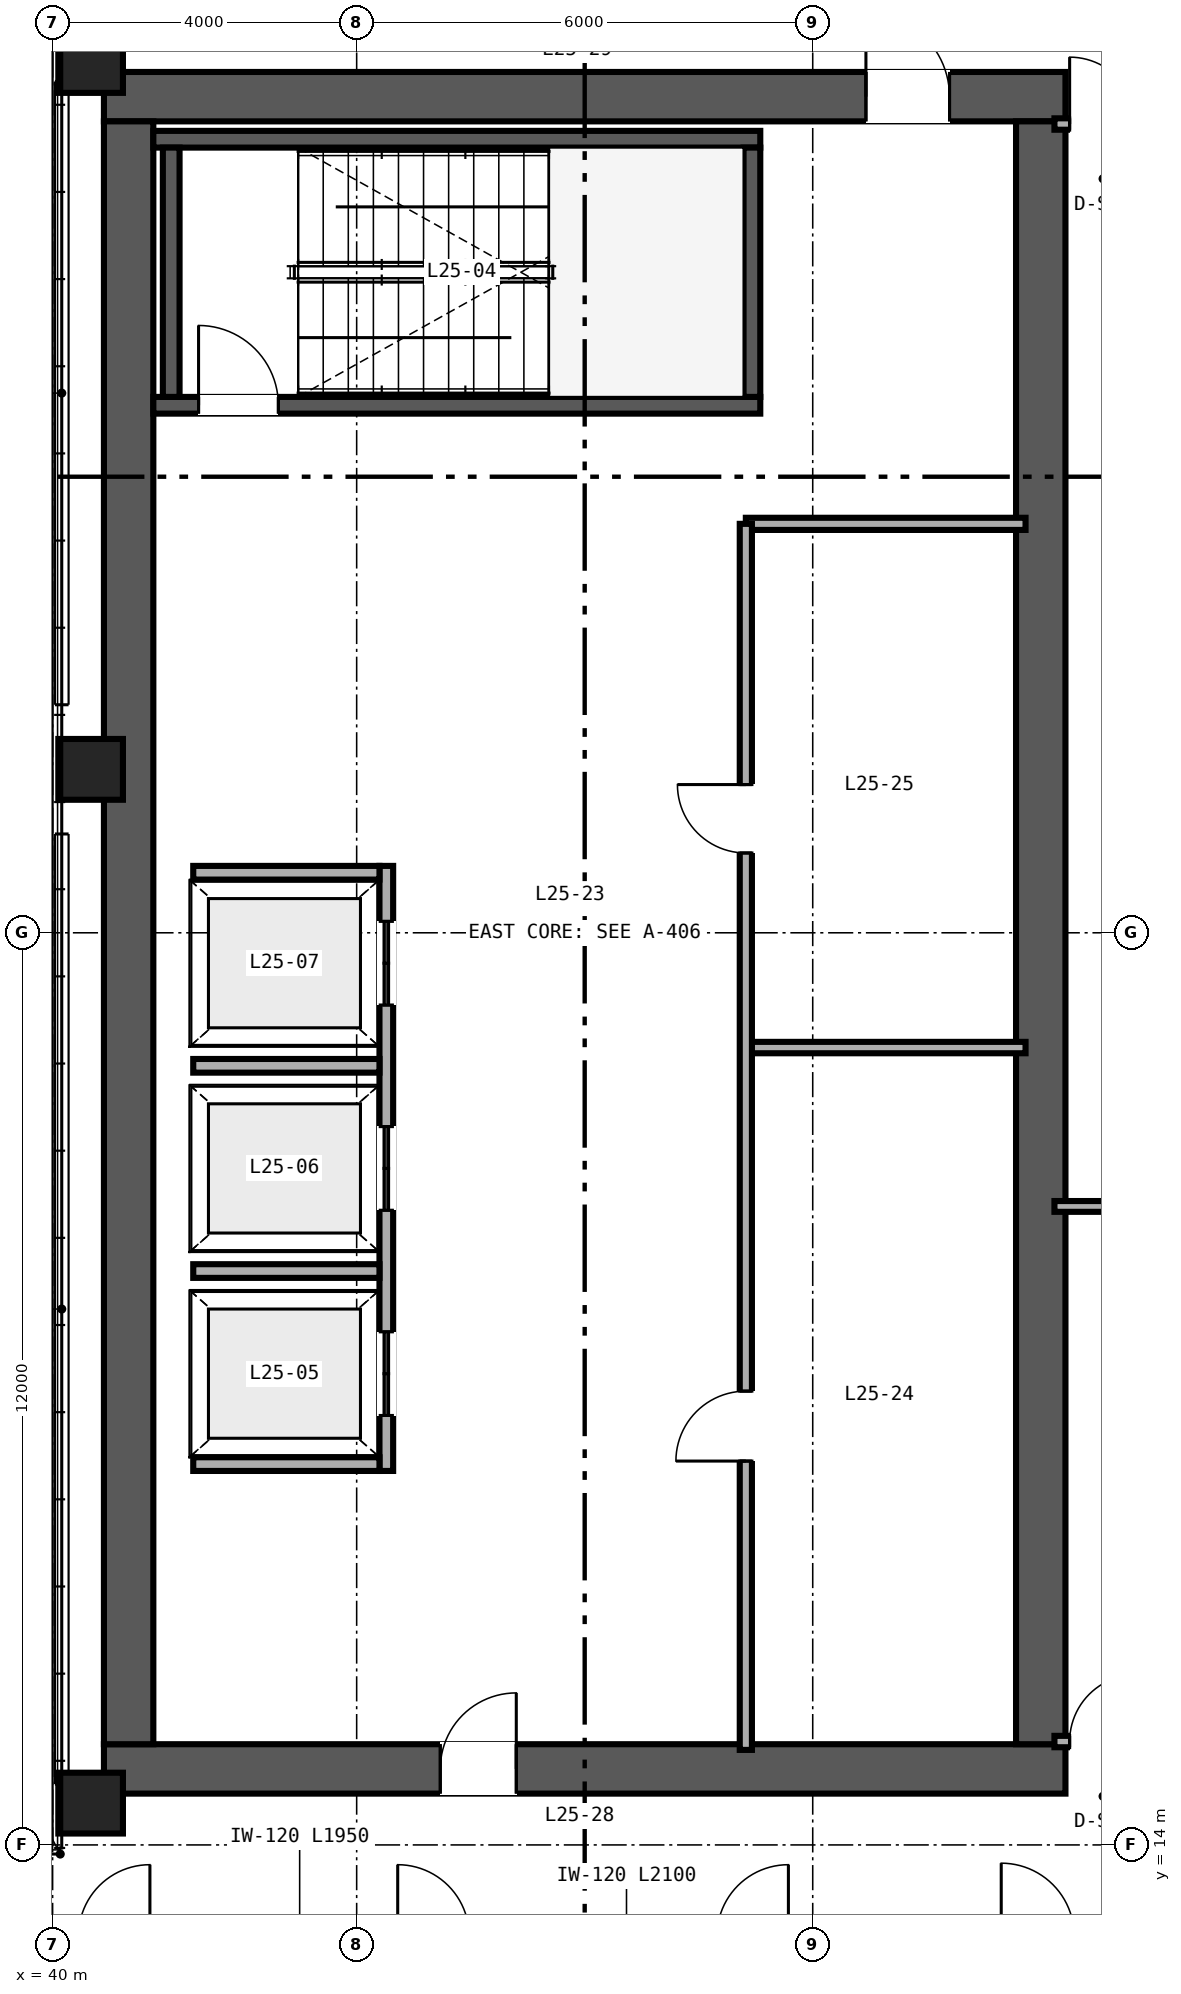
"""IFC4 building model, lengths in metres.
Left out: names, types, materials, properties, quantities, classifications, styles, units other than length and angle.
Written with IfcOpenShell. Run it as: python <this file> out.ifc"""

import sys

from ifc_helpers import new_model, si_unit, direction, frame, frame_2d, origin, origin_2d, place, context, subcontext, project, spatial, rectangle, hollow_rectangle, extrude, source, transform, mapped, element, fill, save


model = new_model("IFC4")
c1 = context("Model", 3, precision=1e-05, world=origin(), true_north=direction((0.0, 1.0)))
c2 = subcontext(c1, "Body", "Model", "MODEL_VIEW")
j1 = project(units=[si_unit("LENGTHUNIT", "METRE"), si_unit("PLANEANGLEUNIT", "RADIAN")], contexts=[c1])
p1 = place(None, origin())
s1 = spatial("IfcSite", under=j1, at=p1, CompositionType="ELEMENT")
p2 = place(p1, origin())
s2 = spatial("IfcBuilding", under=s1, at=p2, CompositionType="ELEMENT")
p3 = place(p2, frame((0.0, 0.0, 104.4)))
s3 = spatial("IfcBuildingStorey", under=s2, at=p3, CompositionType="ELEMENT", Elevation=104.4)
p4 = place(p3, frame((40.675, 15.0, 0.0), z_axis=(0.0, 0.0, 1.0), x_axis=(1.0, 0.0, 0.0)))
e1 = element("IfcWall", 1, at=p4, inside=s3, PredefinedType="SHEAR", context=c2, shape_type="SweptSolid", body=[
    extrude(rectangle(XDim=12.65, YDim=0.65, at=frame_2d((6.325, 0.0))), origin(), (0.0, 0.0, 1.0), 3.36),
])
p5 = place(p4, frame((4.425, 0.0, 0.0)))
e2 = element("IfcOpeningElement", 2, at=p5, cuts=e1, PredefinedType="OPENING", context=c2, shape_type="SweptSolid", body=[
    extrude(rectangle(XDim=1.0, YDim=2.15, at=frame_2d((0.5, 1.075))), frame((0.0, 0.335, 0.0), z_axis=(0.0, -1.0, 0.0), x_axis=(1.0, 0.0, 0.0)), (0.0, 0.0, 1.0), 0.67),
])
p6 = place(p3, frame((40.675, 37.0, 0.0), z_axis=(0.0, 0.0, 1.0), x_axis=(1.0, 0.0, 0.0)))
e3 = element("IfcWall", 3, at=p6, inside=s3, PredefinedType="SHEAR", context=c2, shape_type="SweptSolid", body=[
    extrude(rectangle(XDim=12.65, YDim=0.65, at=frame_2d((6.325, 0.0))), origin(), (0.0, 0.0, 1.0), 3.36),
])
p7 = place(p6, frame((10.025, 0.0, 0.0)))
e4 = element("IfcOpeningElement", 4, at=p7, cuts=e3, PredefinedType="OPENING", context=c2, shape_type="SweptSolid", body=[
    extrude(rectangle(XDim=1.1, YDim=2.15, at=frame_2d((0.55, 1.075))), frame((0.0, 0.335, 0.0), z_axis=(0.0, -1.0, 0.0), x_axis=(1.0, 0.0, 0.0)), (0.0, 0.0, 1.0), 0.67),
])
for number, where, z_axis, x_axis in (
    (5, (41.0, 15.325, 0.0), (0.0, 0.0, 1.0), (0.0, 1.0, 0.0)),
    (6, (53.0, 15.325, 0.0), (0.0, 0.0, 1.0), (0.0, 1.0, 0.0)),
):
    element("IfcWall", number, at=place(p3, frame(where, z_axis=z_axis, x_axis=x_axis)), inside=s3, PredefinedType="SHEAR", context=c2, shape_type="SweptSolid", body=[
        extrude(rectangle(XDim=21.35, YDim=0.65, at=frame_2d((10.675, 0.0))), origin(), (0.0, 0.0, 1.0), 3.36),
    ])
p8 = place(p3, frame((41.325, 32.94, 0.0), z_axis=(0.0, 0.0, 1.0), x_axis=(1.0, 0.0, 0.0)))
e7 = element("IfcWall", 7, at=p8, inside=s3, PredefinedType="SHEAR", context=c2, shape_type="SweptSolid", body=[
    extrude(rectangle(XDim=7.985, YDim=0.22, at=frame_2d((3.993, 0.0))), origin(), (0.0, 0.0, 1.0), 3.4),
])
p9 = place(p8, frame((0.595, 0.0, 0.0)))
e8 = element("IfcOpeningElement", 8, at=p9, cuts=e7, PredefinedType="OPENING", context=c2, shape_type="SweptSolid", body=[
    extrude(rectangle(XDim=1.05, YDim=2.15, at=frame_2d((0.525, 1.075))), frame((0.0, 0.12, 0.0), z_axis=(0.0, -1.0, 0.0), x_axis=(1.0, 0.0, 0.0)), (0.0, 0.0, 1.0), 0.24),
])
p10 = place(p3, frame((41.325, 36.44, 0.0), z_axis=(0.0, 0.0, 1.0), x_axis=(1.0, 0.0, 0.0)))
e9 = element("IfcWall", 9, at=p10, inside=s3, PredefinedType="SHEAR", context=c2, shape_type="SweptSolid", body=[
    extrude(rectangle(XDim=7.985, YDim=0.22, at=frame_2d((3.993, 0.0))), origin(), (0.0, 0.0, 1.0), 3.4),
])
for number, where, z_axis, x_axis in (
    (10, (41.56, 33.05, 0.0), (0.0, 0.0, 1.0), (0.0, 1.0, 0.0)),
    (11, (49.2, 33.05, 0.0), (0.0, 0.0, 1.0), (0.0, 1.0, 0.0)),
):
    element("IfcWall", number, at=place(p3, frame(where, z_axis=z_axis, x_axis=x_axis)), inside=s3, PredefinedType="SHEAR", context=c2, shape_type="SweptSolid", body=[
        extrude(rectangle(XDim=3.28, YDim=0.22, at=frame_2d((1.64, 0.0))), origin(), (0.0, 0.0, 1.0), 3.4),
    ])
m1 = source(origin(), c2, "Body", "SweptSolid", [
    extrude(hollow_rectangle(XDim=0.85, YDim=0.8, WallThickness=0.032, at=origin_2d()), origin(), (0.0, 0.0, 1.0), 3.36),
])
for number, where, z_axis, x_axis in (
    (12, (40.5, 14.55, 0.0), (0.0, 0.0, 1.0), (1.0, 0.0, 0.0)),
    (13, (40.5, 28.15, 0.0), (0.0, 0.0, 1.0), (1.0, 0.0, 0.0)),
    (14, (40.5, 37.45, 0.0), (0.0, 0.0, 1.0), (1.0, 0.0, 0.0)),
):
    element("IfcColumn", number, at=place(p3, frame(where, z_axis=z_axis, x_axis=x_axis)), inside=s3, PredefinedType="COLUMN", context=c2, shape_type="MappedRepresentation", body=[
        mapped(m1, transform((0.0, 0.0, 0.0), scale=1.0)),
    ])
p11 = place(p3, frame((44.39, 18.92, 0.0), z_axis=(0.0, 0.0, 1.0), x_axis=(0.0, 1.0, 0.0)))
e15 = element("IfcWall", 15, at=p11, inside=s3, PredefinedType="SOLIDWALL", context=c2, shape_type="SweptSolid", body=[
    extrude(rectangle(XDim=7.96, YDim=0.18, at=frame_2d((3.98, 0.0))), origin(), (0.0, 0.0, 1.0), 3.36),
])
p12 = place(p11, frame((0.73, 0.0, 0.0)))
e16 = element("IfcOpeningElement", 16, at=p12, cuts=e15, PredefinedType="OPENING", context=c2, shape_type="SweptSolid", body=[
    extrude(rectangle(XDim=1.1, YDim=2.2, at=frame_2d((0.55, 1.1))), frame((0.0, 0.1, 0.0), z_axis=(0.0, -1.0, 0.0), x_axis=(1.0, 0.0, 0.0)), (0.0, 0.0, 1.0), 0.2),
])
p13 = place(p11, frame((3.43, 0.0, 0.0)))
e17 = element("IfcOpeningElement", 17, at=p13, cuts=e15, PredefinedType="OPENING", context=c2, shape_type="SweptSolid", body=[
    extrude(rectangle(XDim=1.1, YDim=2.2, at=frame_2d((0.55, 1.1))), frame((0.0, 0.1, 0.0), z_axis=(0.0, -1.0, 0.0), x_axis=(1.0, 0.0, 0.0)), (0.0, 0.0, 1.0), 0.2),
])
p14 = place(p11, frame((6.13, 0.0, 0.0)))
e18 = element("IfcOpeningElement", 18, at=p14, cuts=e15, PredefinedType="OPENING", context=c2, shape_type="SweptSolid", body=[
    extrude(rectangle(XDim=1.1, YDim=2.2, at=frame_2d((0.55, 1.1))), frame((0.0, 0.1, 0.0), z_axis=(0.0, -1.0, 0.0), x_axis=(1.0, 0.0, 0.0)), (0.0, 0.0, 1.0), 0.2),
])
for number, where, z_axis, x_axis in (
    (19, (41.85, 19.01, 0.0), (0.0, 0.0, 1.0), (1.0, 0.0, 0.0)),
    (20, (41.85, 26.79, 0.0), (0.0, 0.0, 1.0), (1.0, 0.0, 0.0)),
    (21, (41.85, 21.55, 0.0), (0.0, 0.0, 1.0), (1.0, 0.0, 0.0)),
    (22, (41.85, 24.25, 0.0), (0.0, 0.0, 1.0), (1.0, 0.0, 0.0)),
):
    element("IfcWall", number, at=place(p3, frame(where, z_axis=z_axis, x_axis=x_axis)), inside=s3, PredefinedType="SOLIDWALL", context=c2, shape_type="SweptSolid", body=[
        extrude(rectangle(XDim=2.45, YDim=0.18, at=frame_2d((1.225, 0.0))), origin(), (0.0, 0.0, 1.0), 3.36),
    ])
p15 = place(p3, frame((49.12, 31.38, 0.0), z_axis=(0.0, 0.0, 1.0), x_axis=(1.0, 0.0, 0.0)))
e23 = element("IfcWall", 23, at=p15, inside=s3, PredefinedType="PARTITIONING", context=c2, shape_type="SweptSolid", body=[
    extrude(rectangle(XDim=3.68, YDim=0.16, at=frame_2d((1.84, 0.0))), origin(), (0.0, 0.0, 1.0), 2.36),
])
p16 = place(p3, frame((49.12, 24.49, 0.0), z_axis=(0.0, 0.0, 1.0), x_axis=(1.0, 0.0, 0.0)))
e24 = element("IfcWall", 24, at=p16, inside=s3, PredefinedType="PARTITIONING", context=c2, shape_type="SweptSolid", body=[
    extrude(rectangle(XDim=3.68, YDim=0.15, at=frame_2d((1.84, 0.0))), origin(), (0.0, 0.0, 1.0), 3.36),
])
p17 = place(p3, frame((49.12, 15.25, 0.0), z_axis=(0.0, 0.0, 1.0), x_axis=(0.0, 1.0, 0.0)))
e25 = element("IfcWall", 25, at=p17, inside=s3, PredefinedType="PARTITIONING", context=c2, shape_type="SweptSolid", body=[
    extrude(rectangle(XDim=16.13, YDim=0.16, at=frame_2d((8.065, 0.0))), origin(), (0.0, 0.0, 1.0), 2.36),
])
p18 = place(p17, frame((3.8, 0.0, 0.0)))
e26 = element("IfcOpeningElement", 26, at=p18, cuts=e25, PredefinedType="OPENING", context=c2, shape_type="SweptSolid", body=[
    extrude(rectangle(XDim=0.92, YDim=2.15, at=frame_2d((0.46, 1.075))), frame((0.0, 0.09, 0.0), z_axis=(0.0, -1.0, 0.0), x_axis=(1.0, 0.0, 0.0)), (0.0, 0.0, 1.0), 0.18),
])
p19 = place(p17, frame((11.8, 0.0, 0.0)))
e27 = element("IfcOpeningElement", 27, at=p19, cuts=e25, PredefinedType="OPENING", context=c2, shape_type="SweptSolid", body=[
    extrude(rectangle(XDim=0.9, YDim=2.15, at=frame_2d((0.45, 1.075))), frame((0.0, 0.09, 0.0), z_axis=(0.0, -1.0, 0.0), x_axis=(1.0, 0.0, 0.0)), (0.0, 0.0, 1.0), 0.18),
])
p20 = place(p3, frame((53.18, 15.36, 0.0), z_axis=(0.0, 0.0, 1.0), x_axis=(1.0, 0.0, 0.0)))
e28 = element("IfcWall", 28, at=p20, inside=s3, PredefinedType="PARTITIONING", context=c2, shape_type="SweptSolid", body=[
    extrude(rectangle(XDim=2.66, YDim=0.15, at=frame_2d((1.33, 0.0))), origin(), (0.0, 0.0, 1.0), 2.581),
])
p21 = place(p20, frame((0.2, 0.0, 0.0)))
e29 = element("IfcOpeningElement", 29, at=p21, cuts=e28, PredefinedType="OPENING", context=c2, shape_type="SweptSolid", body=[
    extrude(rectangle(XDim=0.88, YDim=2.15, at=frame_2d((0.44, 1.075))), frame((0.0, 0.085, 0.0), z_axis=(0.0, -1.0, 0.0), x_axis=(1.0, 0.0, 0.0)), (0.0, 0.0, 1.0), 0.17),
])
p22 = place(p3, frame((53.18, 36.64, 0.0), z_axis=(0.0, 0.0, 1.0), x_axis=(1.0, 0.0, 0.0)))
e30 = element("IfcWall", 30, at=p22, inside=s3, PredefinedType="PARTITIONING", context=c2, shape_type="SweptSolid", body=[
    extrude(rectangle(XDim=2.66, YDim=0.15, at=frame_2d((1.33, 0.0))), origin(), (0.0, 0.0, 1.0), 2.743),
])
p23 = place(p22, frame((0.2, 0.0, 0.0)))
e31 = element("IfcOpeningElement", 31, at=p23, cuts=e30, PredefinedType="OPENING", context=c2, shape_type="SweptSolid", body=[
    extrude(rectangle(XDim=0.88, YDim=2.15, at=frame_2d((0.44, 1.075))), frame((0.0, 0.085, 0.0), z_axis=(0.0, -1.0, 0.0), x_axis=(1.0, 0.0, 0.0)), (0.0, 0.0, 1.0), 0.17),
])
p24 = place(p3, frame((53.18, 22.4, 0.0), z_axis=(0.0, 0.0, 1.0), x_axis=(1.0, 0.0, 0.0)))
e32 = element("IfcWall", 32, at=p24, inside=s3, PredefinedType="PARTITIONING", context=c2, shape_type="SweptSolid", body=[
    extrude(rectangle(XDim=2.66, YDim=0.142, at=frame_2d((1.33, 0.0))), origin(), (0.0, 0.0, 1.0), 2.581),
])
m2 = source(origin(), c2, "Body", "SweptSolid", [
    extrude(rectangle(XDim=1.05, YDim=2.15, at=frame_2d((0.525, 1.075))), frame((0.0, 0.025, 0.0), z_axis=(0.0, -1.0, 0.0), x_axis=(1.0, 0.0, 0.0)), (0.0, 0.0, 1.0), 0.05),
])
p25 = place(p9, origin())
e33 = element("IfcDoor", 33, at=p25, inside=s3, OperationType="SINGLE_SWING_LEFT", PredefinedType="DOOR", context=c2, shape_type="MappedRepresentation", body=[
    mapped(m2, transform((0.0, 0.0, 0.0), scale=1.0)),
])
fill(e8, e33)
m3 = source(origin(), c2, "Body", "SweptSolid", [
    extrude(rectangle(XDim=1.1, YDim=2.2, at=frame_2d((0.55, 1.1))), frame((0.0, 0.025, 0.0), z_axis=(0.0, -1.0, 0.0), x_axis=(1.0, 0.0, 0.0)), (0.0, 0.0, 1.0), 0.05),
])
p26 = place(p12, origin())
e34 = element("IfcDoor", 34, at=p26, inside=s3, OperationType="DOUBLE_DOOR_SLIDING", PredefinedType="DOOR", context=c2, shape_type="MappedRepresentation", body=[
    mapped(m3, transform((0.0, 0.0, 0.0), scale=1.0)),
])
fill(e16, e34)
p27 = place(p13, origin())
e35 = element("IfcDoor", 35, at=p27, inside=s3, OperationType="DOUBLE_DOOR_SLIDING", PredefinedType="DOOR", context=c2, shape_type="MappedRepresentation", body=[
    mapped(m3, transform((0.0, 0.0, 0.0), scale=1.0)),
])
fill(e17, e35)
p28 = place(p14, origin())
e36 = element("IfcDoor", 36, at=p28, inside=s3, OperationType="DOUBLE_DOOR_SLIDING", PredefinedType="DOOR", context=c2, shape_type="MappedRepresentation", body=[
    mapped(m3, transform((0.0, 0.0, 0.0), scale=1.0)),
])
fill(e18, e36)
m4 = source(origin(), c2, "Body", "SweptSolid", [
    extrude(rectangle(XDim=1.0, YDim=2.15, at=frame_2d((0.5, 1.075))), frame((0.0, 0.025, 0.0), z_axis=(0.0, -1.0, 0.0), x_axis=(1.0, 0.0, 0.0)), (0.0, 0.0, 1.0), 0.05),
])
p29 = place(p5, origin())
e37 = element("IfcDoor", 37, at=p29, inside=s3, OperationType="SINGLE_SWING_RIGHT", PredefinedType="DOOR", context=c2, shape_type="MappedRepresentation", body=[
    mapped(m4, transform((0.0, 0.0, 0.0), scale=1.0)),
])
fill(e2, e37)
m5 = source(origin(), c2, "Body", "SweptSolid", [
    extrude(rectangle(XDim=1.1, YDim=2.15, at=frame_2d((0.55, 1.075))), frame((0.0, 0.025, 0.0), z_axis=(0.0, -1.0, 0.0), x_axis=(1.0, 0.0, 0.0)), (0.0, 0.0, 1.0), 0.05),
])
p30 = place(p7, origin())
e38 = element("IfcDoor", 38, at=p30, inside=s3, OperationType="SINGLE_SWING_LEFT", PredefinedType="DOOR", context=c2, shape_type="MappedRepresentation", body=[
    mapped(m5, transform((0.0, 0.0, 0.0), scale=1.0)),
])
fill(e4, e38)
m6 = source(origin(), c2, "Body", "SweptSolid", [
    extrude(rectangle(XDim=0.92, YDim=2.15, at=frame_2d((0.46, 1.075))), frame((0.0, 0.025, 0.0), z_axis=(0.0, -1.0, 0.0), x_axis=(1.0, 0.0, 0.0)), (0.0, 0.0, 1.0), 0.05),
])
p31 = place(p18, origin())
e39 = element("IfcDoor", 39, at=p31, inside=s3, OperationType="SINGLE_SWING_LEFT", PredefinedType="DOOR", context=c2, shape_type="MappedRepresentation", body=[
    mapped(m6, transform((0.0, 0.0, 0.0), scale=1.0)),
])
fill(e26, e39)
m7 = source(origin(), c2, "Body", "SweptSolid", [
    extrude(rectangle(XDim=0.9, YDim=2.15, at=frame_2d((0.45, 1.075))), frame((0.0, 0.025, 0.0), z_axis=(0.0, -1.0, 0.0), x_axis=(1.0, 0.0, 0.0)), (0.0, 0.0, 1.0), 0.05),
])
p32 = place(p19, origin())
e40 = element("IfcDoor", 40, at=p32, inside=s3, OperationType="SINGLE_SWING_RIGHT", PredefinedType="DOOR", context=c2, shape_type="MappedRepresentation", body=[
    mapped(m7, transform((0.0, 0.0, 0.0), scale=1.0)),
])
fill(e27, e40)
m8 = source(origin(), c2, "Body", "SweptSolid", [
    extrude(rectangle(XDim=0.88, YDim=2.15, at=frame_2d((0.44, 1.075))), frame((0.0, 0.025, 0.0), z_axis=(0.0, -1.0, 0.0), x_axis=(1.0, 0.0, 0.0)), (0.0, 0.0, 1.0), 0.05),
])
p33 = place(p21, origin())
e41 = element("IfcDoor", 41, at=p33, inside=s3, OperationType="SINGLE_SWING_RIGHT", PredefinedType="DOOR", context=c2, shape_type="MappedRepresentation", body=[
    mapped(m8, transform((0.0, 0.0, 0.0), scale=1.0)),
])
fill(e29, e41)
p34 = place(p23, origin())
e42 = element("IfcDoor", 42, at=p34, inside=s3, OperationType="SINGLE_SWING_LEFT", PredefinedType="DOOR", context=c2, shape_type="MappedRepresentation", body=[
    mapped(m8, transform((0.0, 0.0, 0.0), scale=1.0)),
])
fill(e31, e42)
save(model, sys.argv[1])
